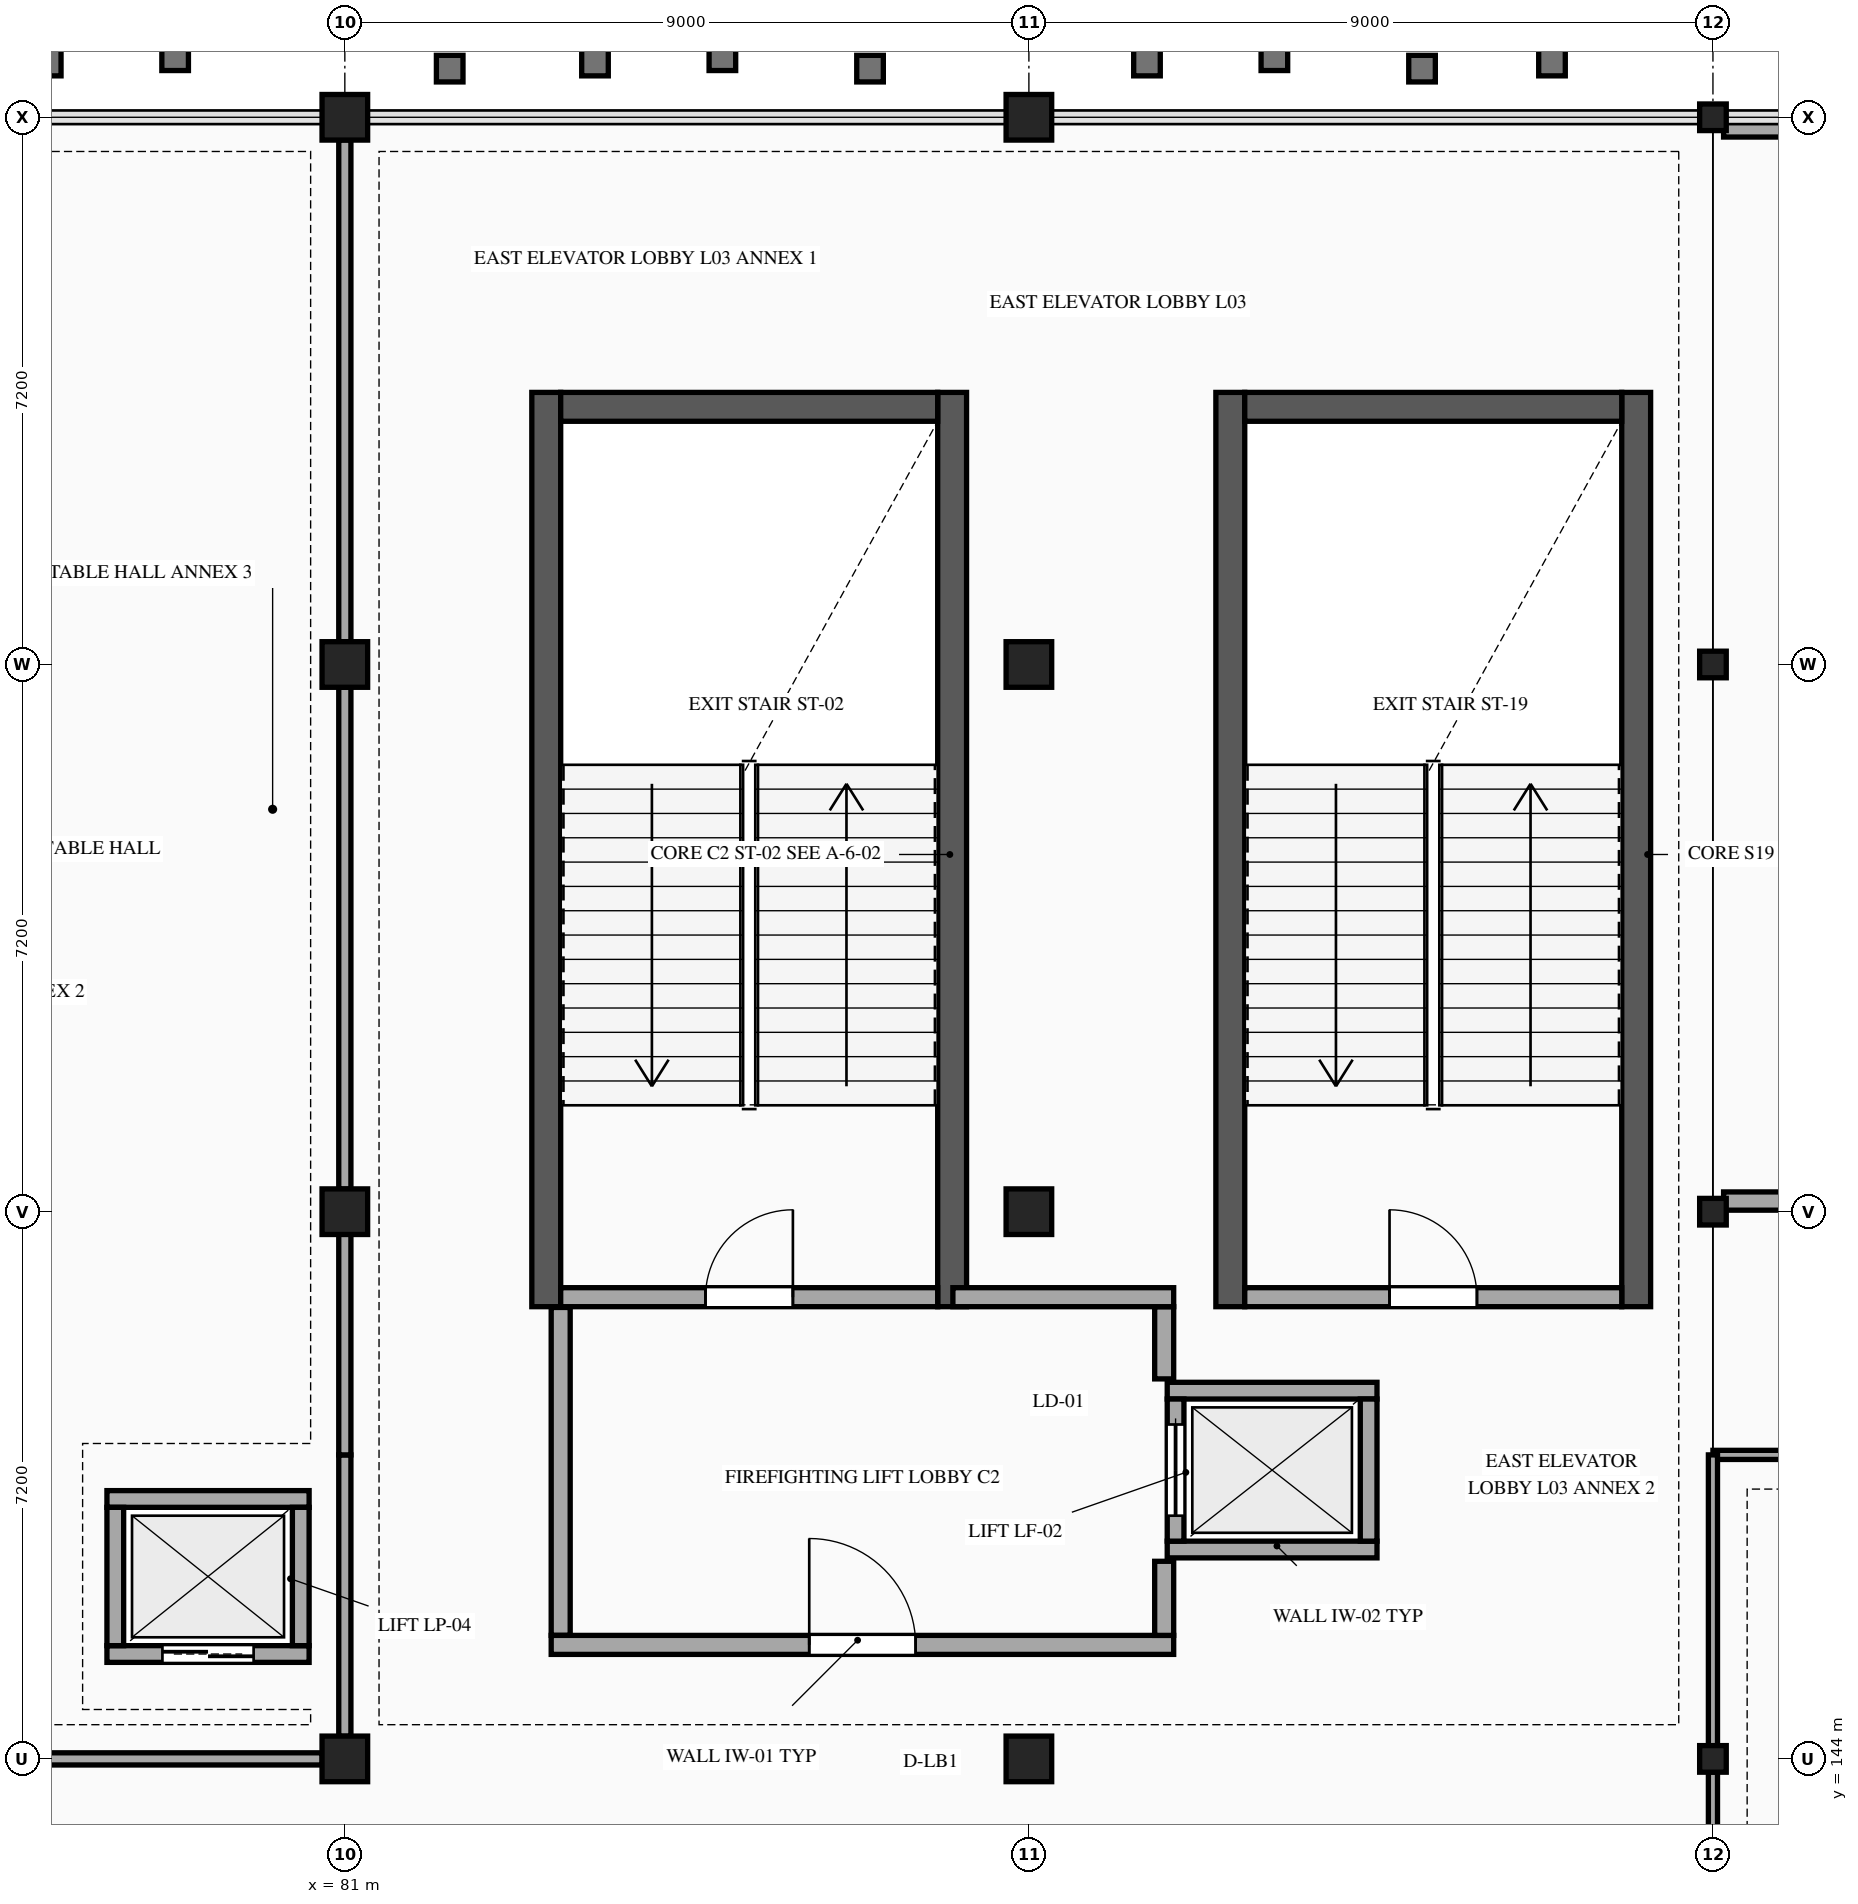
"""IFC4 building model, lengths in metres.
Left out: names, types, materials, properties, quantities, classifications, styles, units other than length and angle.
Written with IfcOpenShell. Run it as: python <this file> out.ifc"""

import sys

from ifc_helpers import new_model, si_unit, direction, frame, frame_2d, origin, origin_2d, place, context, subcontext, project, spatial, rectangle, hollow_rectangle, extrude, element, fill, save


model = new_model("IFC4")
c1 = context("Model", 3, precision=1e-05, world=origin(), true_north=direction((0.0, 1.0)))
c2 = subcontext(c1, "Body", "Model", "MODEL_VIEW")
j1 = project(units=[si_unit("LENGTHUNIT", "METRE"), si_unit("PLANEANGLEUNIT", "RADIAN")], contexts=[c1])
p1 = place(None, origin())
s1 = spatial("IfcSite", under=j1, at=p1, CompositionType="ELEMENT")
p2 = place(p1, origin())
s2 = spatial("IfcBuilding", under=s1, at=p2, CompositionType="ELEMENT")
p3 = place(p2, frame((0.0, 0.0, 15.3)))
s3 = spatial("IfcBuildingStorey", under=s2, at=p3, CompositionType="ELEMENT", Elevation=15.3)
for number, where, z_axis, x_axis in (
    (1, (81.0, 144.0, 0.0), (0.0, 0.0, 1.0), (1.0, 0.0, 0.0)),
    (2, (81.0, 151.2, 0.0), (0.0, 0.0, 1.0), (1.0, 0.0, 0.0)),
    (3, (81.0, 158.4, 0.0), (0.0, 0.0, 1.0), (1.0, 0.0, 0.0)),
    (4, (81.0, 165.6, 0.0), (0.0, 0.0, 1.0), (1.0, 0.0, 0.0)),
    (5, (90.0, 144.0, 0.0), (0.0, 0.0, 1.0), (1.0, 0.0, 0.0)),
    (6, (90.0, 151.2, 0.0), (0.0, 0.0, 1.0), (1.0, 0.0, 0.0)),
    (7, (90.0, 158.4, 0.0), (0.0, 0.0, 1.0), (1.0, 0.0, 0.0)),
    (8, (90.0, 165.6, 0.0), (0.0, 0.0, 1.0), (1.0, 0.0, 0.0)),
):
    element("IfcColumn", number, at=place(p3, frame(where, z_axis=z_axis, x_axis=x_axis)), inside=s3, PredefinedType="COLUMN", context=c2, shape_type="SweptSolid", body=[
        extrude(rectangle(XDim=0.6, YDim=0.6, at=origin_2d()), origin(), (0.0, 0.0, 1.0), 4.5),
    ])
for number, where, z_axis, x_axis in (
    (9, (99.0, 144.0, 0.0), (0.0, 0.0, 1.0), (1.0, 0.0, 0.0)),
    (10, (99.0, 151.2, 0.0), (0.0, 0.0, 1.0), (1.0, 0.0, 0.0)),
    (11, (99.0, 158.4, 0.0), (0.0, 0.0, 1.0), (1.0, 0.0, 0.0)),
    (12, (99.0, 165.6, 0.0), (0.0, 0.0, 1.0), (1.0, 0.0, 0.0)),
):
    element("IfcColumn", number, at=place(p3, frame(where, z_axis=z_axis, x_axis=x_axis)), inside=s3, PredefinedType="COLUMN", context=c2, shape_type="SweptSolid", body=[
        extrude(hollow_rectangle(XDim=0.35, YDim=0.35, WallThickness=0.016, at=origin_2d()), origin(), (0.0, 0.0, 1.0), 4.5),
    ])
for number, where, z_axis, x_axis in (
    (13, (83.65, 149.95, 0.0), (0.0, 0.0, 1.0), (0.0, 1.0, 0.0)),
    (14, (88.99, 161.98, 0.0), (0.0, 0.0, 1.0), (0.0, -1.0, 0.0)),
):
    element("IfcWall", number, at=place(p3, frame(where, z_axis=z_axis, x_axis=x_axis)), inside=s3, PredefinedType="SHEAR", context=c2, shape_type="SweptSolid", body=[
        extrude(rectangle(XDim=12.03, YDim=0.38, at=frame_2d((6.015, 0.0))), origin(), (0.0, 0.0, 1.0), 4.25),
    ])
p4 = place(p3, frame((83.84, 161.79, 0.0), z_axis=(0.0, 0.0, 1.0), x_axis=(1.0, 0.0, 0.0)))
e15 = element("IfcWall", 15, at=p4, inside=s3, PredefinedType="SHEAR", context=c2, shape_type="SweptSolid", body=[
    extrude(rectangle(XDim=4.96, YDim=0.38, at=frame_2d((2.48, 0.0))), origin(), (0.0, 0.0, 1.0), 4.25),
])
for number, where, z_axis, x_axis in (
    (16, (92.65, 149.95, 0.0), (0.0, 0.0, 1.0), (0.0, 1.0, 0.0)),
    (17, (97.99, 161.98, 0.0), (0.0, 0.0, 1.0), (0.0, -1.0, 0.0)),
):
    element("IfcWall", number, at=place(p3, frame(where, z_axis=z_axis, x_axis=x_axis)), inside=s3, PredefinedType="SHEAR", context=c2, shape_type="SweptSolid", body=[
        extrude(rectangle(XDim=12.03, YDim=0.38, at=frame_2d((6.015, 0.0))), origin(), (0.0, 0.0, 1.0), 4.25),
    ])
p5 = place(p3, frame((92.84, 161.79, 0.0), z_axis=(0.0, 0.0, 1.0), x_axis=(1.0, 0.0, 0.0)))
e18 = element("IfcWall", 18, at=p5, inside=s3, PredefinedType="SHEAR", context=c2, shape_type="SweptSolid", body=[
    extrude(rectangle(XDim=4.96, YDim=0.38, at=frame_2d((2.48, 0.0))), origin(), (0.0, 0.0, 1.0), 4.25),
])
p6 = place(p3, frame((135.0, 151.34, 4.5), z_axis=(0.0, 0.0, 1.0), x_axis=(-1.0, 0.0, 0.0)))
e19 = element("IfcWall", 19, at=p6, inside=s3, PredefinedType="PARAPET", context=c2, shape_type="SweptSolid", body=[
    extrude(rectangle(XDim=35.86, YDim=0.24, at=frame_2d((17.93, 0.0))), origin(), (0.0, 0.0, 1.0), 0.65),
])
p7 = place(p3, frame((99.14, 165.46, 4.5), z_axis=(0.0, 0.0, 1.0), x_axis=(1.0, 0.0, 0.0)))
e20 = element("IfcWall", 20, at=p7, inside=s3, PredefinedType="PARAPET", context=c2, shape_type="SweptSolid", body=[
    extrude(rectangle(XDim=53.72, YDim=0.24, at=frame_2d((26.86, 0.0))), origin(), (0.0, 0.0, 1.0), 0.65),
])
p8 = place(p3, frame((83.84, 150.075, 0.0), z_axis=(0.0, 0.0, 1.0), x_axis=(1.0, 0.0, 0.0)))
e21 = element("IfcWall", 21, at=p8, inside=s3, PredefinedType="STANDARD", context=c2, shape_type="SweptSolid", body=[
    extrude(rectangle(XDim=4.96, YDim=0.25, at=frame_2d((2.48, 0.0))), origin(), (0.0, 0.0, 1.0), 4.25),
])
p9 = place(p8, frame((1.905, 0.0, 0.0)))
e22 = element("IfcOpeningElement", 22, at=p9, cuts=e21, PredefinedType="OPENING", context=c2, shape_type="SweptSolid", body=[
    extrude(rectangle(XDim=1.15, YDim=2.2, at=frame_2d((0.575, 1.1))), frame((0.0, 0.135, 0.0), z_axis=(0.0, -1.0, 0.0), x_axis=(1.0, 0.0, 0.0)), (0.0, 0.0, 1.0), 0.27),
])
for number, where, z_axis, x_axis in (
    (23, (91.82, 146.755, 0.0), (0.0, 0.0, 1.0), (1.0, 0.0, 0.0)),
    (24, (94.58, 148.845, 0.0), (0.0, 0.0, 1.0), (-1.0, 0.0, 0.0)),
):
    element("IfcWall", number, at=place(p3, frame(where, z_axis=z_axis, x_axis=x_axis)), inside=s3, PredefinedType="STANDARD", context=c2, shape_type="SweptSolid", body=[
        extrude(rectangle(XDim=2.76, YDim=0.22, at=frame_2d((1.38, 0.0))), origin(), (0.0, 0.0, 1.0), 4.25),
    ])
p10 = place(p3, frame((91.93, 148.735, 0.0), z_axis=(0.0, 0.0, 1.0), x_axis=(0.0, -1.0, 0.0)))
e25 = element("IfcWall", 25, at=p10, inside=s3, PredefinedType="STANDARD", context=c2, shape_type="SweptSolid", body=[
    extrude(rectangle(XDim=1.87, YDim=0.22, at=frame_2d((0.935, 0.0))), origin(), (0.0, 0.0, 1.0), 4.25),
])
p11 = place(p10, frame((0.335, 0.0, 0.0)))
e26 = element("IfcOpeningElement", 26, at=p11, cuts=e25, PredefinedType="OPENING", context=c2, shape_type="SweptSolid", body=[
    extrude(rectangle(XDim=1.2, YDim=2.2, at=frame_2d((0.6, 1.1))), frame((0.0, 0.12, 0.0), z_axis=(0.0, -1.0, 0.0), x_axis=(1.0, 0.0, 0.0)), (0.0, 0.0, 1.0), 0.24),
])
p12 = place(p3, frame((94.47, 146.865, 0.0), z_axis=(0.0, 0.0, 1.0), x_axis=(0.0, 1.0, 0.0)))
e27 = element("IfcWall", 27, at=p12, inside=s3, PredefinedType="STANDARD", context=c2, shape_type="SweptSolid", body=[
    extrude(rectangle(XDim=1.87, YDim=0.22, at=frame_2d((0.935, 0.0))), origin(), (0.0, 0.0, 1.0), 4.25),
])
p13 = place(p3, frame((77.87, 145.38, 0.0), z_axis=(0.0, 0.0, 1.0), x_axis=(1.0, 0.0, 0.0)))
e28 = element("IfcWall", 28, at=p13, inside=s3, PredefinedType="STANDARD", context=c2, shape_type="SweptSolid", body=[
    extrude(rectangle(XDim=2.66, YDim=0.22, at=frame_2d((1.33, 0.0))), origin(), (0.0, 0.0, 1.0), 4.25),
])
p14 = place(p13, frame((0.73, 0.0, 0.0)))
e29 = element("IfcOpeningElement", 29, at=p14, cuts=e28, PredefinedType="OPENING", context=c2, shape_type="SweptSolid", body=[
    extrude(rectangle(XDim=1.2, YDim=2.2, at=frame_2d((0.6, 1.1))), frame((0.0, 0.12, 0.0), z_axis=(0.0, -1.0, 0.0), x_axis=(1.0, 0.0, 0.0)), (0.0, 0.0, 1.0), 0.24),
])
p15 = place(p3, frame((80.53, 147.42, 0.0), z_axis=(0.0, 0.0, 1.0), x_axis=(-1.0, 0.0, 0.0)))
e30 = element("IfcWall", 30, at=p15, inside=s3, PredefinedType="STANDARD", context=c2, shape_type="SweptSolid", body=[
    extrude(rectangle(XDim=2.66, YDim=0.22, at=frame_2d((1.33, 0.0))), origin(), (0.0, 0.0, 1.0), 4.25),
])
for number, where, z_axis, x_axis in (
    (31, (77.98, 147.31, 0.0), (0.0, 0.0, 1.0), (0.0, -1.0, 0.0)),
    (32, (80.42, 145.49, 0.0), (0.0, 0.0, 1.0), (0.0, 1.0, 0.0)),
):
    element("IfcWall", number, at=place(p3, frame(where, z_axis=z_axis, x_axis=x_axis)), inside=s3, PredefinedType="STANDARD", context=c2, shape_type="SweptSolid", body=[
        extrude(rectangle(XDim=1.82, YDim=0.22, at=frame_2d((0.91, 0.0))), origin(), (0.0, 0.0, 1.0), 4.25),
    ])
p16 = place(p3, frame((92.84, 150.075, 0.0), z_axis=(0.0, 0.0, 1.0), x_axis=(1.0, 0.0, 0.0)))
e33 = element("IfcWall", 33, at=p16, inside=s3, PredefinedType="STANDARD", context=c2, shape_type="SweptSolid", body=[
    extrude(rectangle(XDim=4.96, YDim=0.25, at=frame_2d((2.48, 0.0))), origin(), (0.0, 0.0, 1.0), 4.25),
])
p17 = place(p16, frame((1.905, 0.0, 0.0)))
e34 = element("IfcOpeningElement", 34, at=p17, cuts=e33, PredefinedType="OPENING", context=c2, shape_type="SweptSolid", body=[
    extrude(rectangle(XDim=1.15, YDim=2.2, at=frame_2d((0.575, 1.1))), frame((0.0, 0.135, 0.0), z_axis=(0.0, -1.0, 0.0), x_axis=(1.0, 0.0, 0.0)), (0.0, 0.0, 1.0), 0.27),
])
p18 = place(p3, frame((83.84, 149.94, 0.0), z_axis=(0.0, 0.0, 1.0), x_axis=(0.0, -1.0, 0.0)))
e35 = element("IfcWall", 35, at=p18, inside=s3, PredefinedType="STANDARD", context=c2, shape_type="SweptSolid", body=[
    extrude(rectangle(XDim=4.315, YDim=0.25, at=frame_2d((2.157, 0.0))), origin(), (0.0, 0.0, 1.0), 3.638),
])
p19 = place(p3, frame((83.715, 145.5, 0.0), z_axis=(0.0, 0.0, 1.0), x_axis=(1.0, 0.0, 0.0)))
e36 = element("IfcWall", 36, at=p19, inside=s3, PredefinedType="STANDARD", context=c2, shape_type="SweptSolid", body=[
    extrude(rectangle(XDim=8.19, YDim=0.25, at=frame_2d((4.095, 0.0))), origin(), (0.0, 0.0, 1.0), 3.638),
])
p20 = place(p19, frame((3.395, 0.0, 0.0)))
e37 = element("IfcOpeningElement", 37, at=p20, cuts=e36, PredefinedType="OPENING", context=c2, shape_type="SweptSolid", body=[
    extrude(rectangle(XDim=1.4, YDim=2.2, at=frame_2d((0.7, 1.1))), frame((0.0, 0.135, 0.0), z_axis=(0.0, -1.0, 0.0), x_axis=(1.0, 0.0, 0.0)), (0.0, 0.0, 1.0), 0.27),
])
p21 = place(p3, frame((91.78, 145.625, 0.0), z_axis=(0.0, 0.0, 1.0), x_axis=(0.0, 1.0, 0.0)))
e38 = element("IfcWall", 38, at=p21, inside=s3, PredefinedType="STANDARD", context=c2, shape_type="SweptSolid", body=[
    extrude(rectangle(XDim=0.975, YDim=0.25, at=frame_2d((0.488, 0.0))), origin(), (0.0, 0.0, 1.0), 3.638),
])
p22 = place(p3, frame((91.78, 149.0, 0.0), z_axis=(0.0, 0.0, 1.0), x_axis=(0.0, 1.0, 0.0)))
e39 = element("IfcWall", 39, at=p22, inside=s3, PredefinedType="STANDARD", context=c2, shape_type="SweptSolid", body=[
    extrude(rectangle(XDim=0.95, YDim=0.25, at=frame_2d((0.475, 0.0))), origin(), (0.0, 0.0, 1.0), 3.638),
])
p23 = place(p3, frame((89.0, 150.075, 0.0), z_axis=(0.0, 0.0, 1.0), x_axis=(1.0, 0.0, 0.0)))
e40 = element("IfcWall", 40, at=p23, inside=s3, PredefinedType="STANDARD", context=c2, shape_type="SweptSolid", body=[
    extrude(rectangle(XDim=2.905, YDim=0.25, at=frame_2d((1.453, 0.0))), origin(), (0.0, 0.0, 1.0), 3.638),
])
p24 = place(p3, frame((76.5, 144.0, 0.0), z_axis=(0.0, 0.0, 1.0), x_axis=(1.0, 0.0, 0.0)))
e41 = element("IfcWall", 41, at=p24, inside=s3, PredefinedType="PARTITIONING", context=c2, shape_type="SweptSolid", body=[
    extrude(rectangle(XDim=4.202, YDim=0.16, at=frame_2d((2.101, 0.0))), origin(), (0.0, 0.0, 1.0), 3.638),
])
p25 = place(p3, frame((99.0, 148.0, 0.0), z_axis=(0.0, 0.0, 1.0), x_axis=(1.0, 0.0, 0.0)))
e42 = element("IfcWall", 42, at=p25, inside=s3, PredefinedType="PARTITIONING", context=c2, shape_type="SweptSolid", body=[
    extrude(rectangle(XDim=9.0, YDim=0.12, at=frame_2d((4.5, 0.0))), origin(), (0.0, 0.0, 1.0), 3.588),
])
p26 = place(p3, frame((81.0, 144.298, 0.0), z_axis=(0.0, 0.0, 1.0), x_axis=(0.0, 1.0, 0.0)))
e43 = element("IfcWall", 43, at=p26, inside=s3, PredefinedType="PARTITIONING", context=c2, shape_type="SweptSolid", body=[
    extrude(rectangle(XDim=3.702, YDim=0.16, at=frame_2d((1.851, 0.0))), origin(), (0.0, 0.0, 1.0), 3.638),
])
p27 = place(p3, frame((81.0, 148.0, 0.0), z_axis=(0.0, 0.0, 1.0), x_axis=(0.0, 1.0, 0.0)))
e44 = element("IfcWall", 44, at=p27, inside=s3, PredefinedType="PARTITIONING", context=c2, shape_type="SweptSolid", body=[
    extrude(rectangle(XDim=2.902, YDim=0.16, at=frame_2d((1.451, 0.0))), origin(), (0.0, 0.0, 1.0), 3.638),
])
for number, where, z_axis, x_axis in (
    (45, (81.0, 151.498, 0.0), (0.0, 0.0, 1.0), (0.0, 1.0, 0.0)),
    (46, (81.0, 158.698, 0.0), (0.0, 0.0, 1.0), (0.0, 1.0, 0.0)),
):
    element("IfcWall", number, at=place(p3, frame(where, z_axis=z_axis, x_axis=x_axis)), inside=s3, PredefinedType="PARTITIONING", context=c2, shape_type="SweptSolid", body=[
        extrude(rectangle(XDim=6.604, YDim=0.16, at=frame_2d((3.302, 0.0))), origin(), (0.0, 0.0, 1.0), 3.638),
    ])
p28 = place(p3, frame((99.0, 136.973, 0.0), z_axis=(0.0, 0.0, 1.0), x_axis=(0.0, 1.0, 0.0)))
e47 = element("IfcWall", 47, at=p28, inside=s3, PredefinedType="PARTITIONING", context=c2, shape_type="SweptSolid", body=[
    extrude(rectangle(XDim=6.854, YDim=0.12, at=frame_2d((3.427, 0.0))), origin(), (0.0, 0.0, 1.0), 3.588),
])
p29 = place(p3, frame((99.0, 144.173, 0.0), z_axis=(0.0, 0.0, 1.0), x_axis=(0.0, 1.0, 0.0)))
e48 = element("IfcWall", 48, at=p29, inside=s3, PredefinedType="PARTITIONING", context=c2, shape_type="SweptSolid", body=[
    extrude(rectangle(XDim=3.827, YDim=0.12, at=frame_2d((1.914, 0.0))), origin(), (0.0, 0.0, 1.0), 3.588),
])
p30 = place(p9, origin())
e49 = element("IfcDoor", 49, at=p30, inside=s3, OperationType="SINGLE_SWING_RIGHT", PredefinedType="DOOR", context=c2, shape_type="SweptSolid", body=[
    extrude(rectangle(XDim=1.15, YDim=2.2, at=frame_2d((0.575, 1.1))), frame((0.0, 0.025, 0.0), z_axis=(0.0, -1.0, 0.0), x_axis=(1.0, 0.0, 0.0)), (0.0, 0.0, 1.0), 0.05),
])
fill(e22, e49)
p31 = place(p11, origin())
e50 = element("IfcDoor", 50, at=p31, inside=s3, OperationType="DOUBLE_DOOR_SLIDING", PredefinedType="DOOR", context=c2, shape_type="SweptSolid", body=[
    extrude(rectangle(XDim=1.2, YDim=2.2, at=frame_2d((0.6, 1.1))), frame((0.0, 0.025, 0.0), z_axis=(0.0, -1.0, 0.0), x_axis=(1.0, 0.0, 0.0)), (0.0, 0.0, 1.0), 0.05),
])
fill(e26, e50)
p32 = place(p14, origin())
e51 = element("IfcDoor", 51, at=p32, inside=s3, OperationType="DOUBLE_DOOR_SLIDING", PredefinedType="DOOR", context=c2, shape_type="SweptSolid", body=[
    extrude(rectangle(XDim=1.2, YDim=2.2, at=frame_2d((0.6, 1.1))), frame((0.0, 0.025, 0.0), z_axis=(0.0, -1.0, 0.0), x_axis=(1.0, 0.0, 0.0)), (0.0, 0.0, 1.0), 0.05),
])
fill(e29, e51)
p33 = place(p17, origin())
e52 = element("IfcDoor", 52, at=p33, inside=s3, OperationType="SINGLE_SWING_LEFT", PredefinedType="DOOR", context=c2, shape_type="SweptSolid", body=[
    extrude(rectangle(XDim=1.15, YDim=2.2, at=frame_2d((0.575, 1.1))), frame((0.0, 0.025, 0.0), z_axis=(0.0, -1.0, 0.0), x_axis=(1.0, 0.0, 0.0)), (0.0, 0.0, 1.0), 0.05),
])
fill(e34, e52)
p34 = place(p20, origin())
e53 = element("IfcDoor", 53, at=p34, inside=s3, OperationType="SINGLE_SWING_LEFT", PredefinedType="DOOR", context=c2, shape_type="SweptSolid", body=[
    extrude(rectangle(XDim=1.4, YDim=2.2, at=frame_2d((0.7, 1.1))), frame((0.0, 0.025, 0.0), z_axis=(0.0, -1.0, 0.0), x_axis=(1.0, 0.0, 0.0)), (0.0, 0.0, 1.0), 0.05),
])
fill(e37, e53)
save(model, sys.argv[1])
